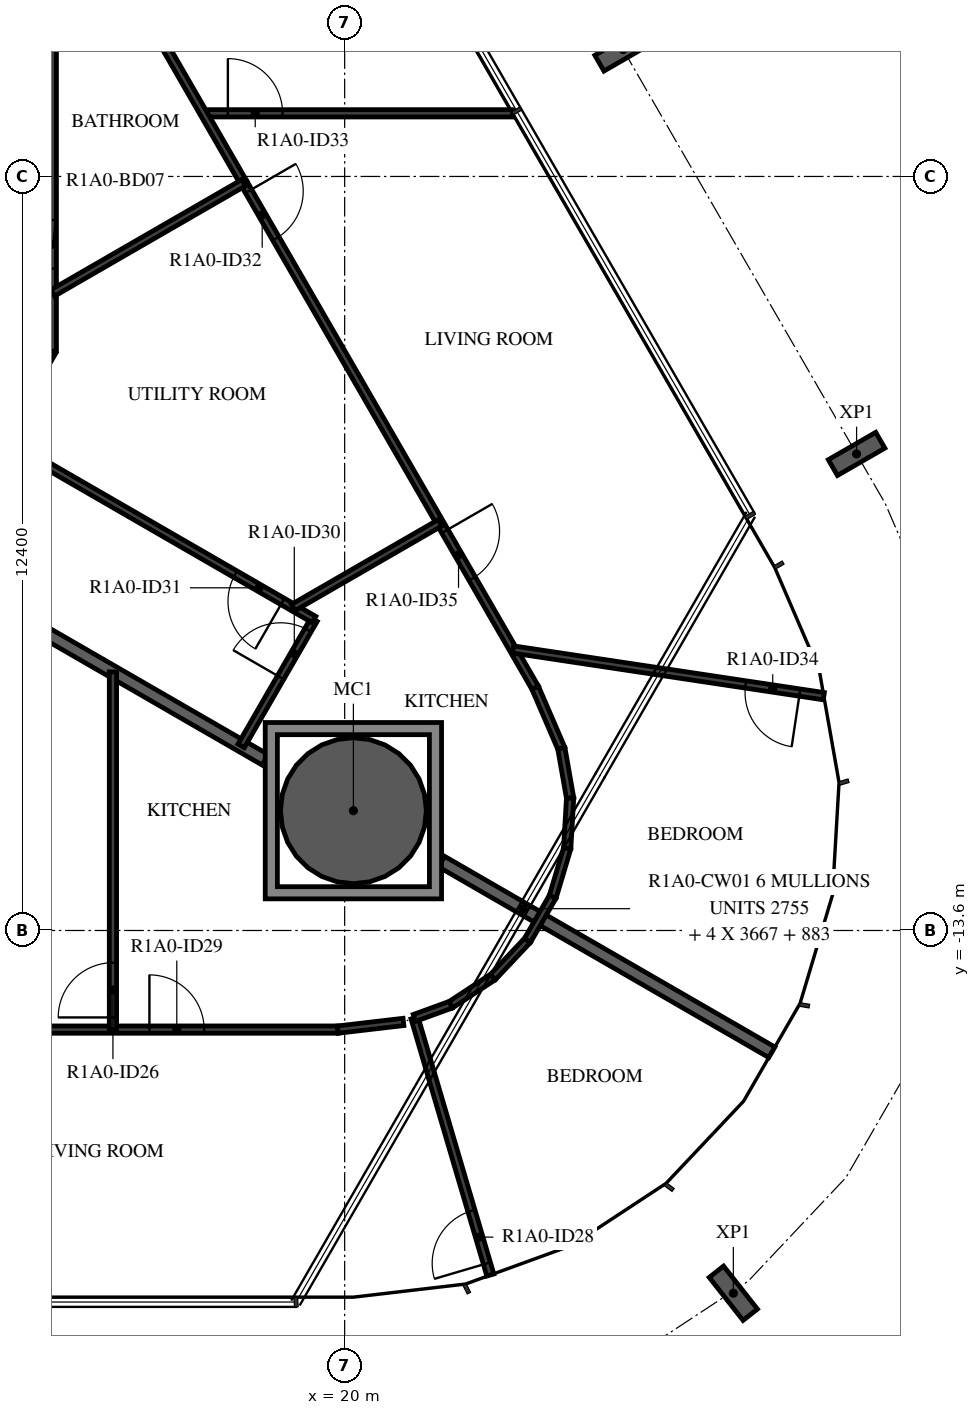
"""IFC4 building model, lengths in metres.
Left out: names, types, materials, properties, quantities, classifications, styles, units other than length and angle.
Written with IfcOpenShell. Run it as: python <this file> out.ifc"""

import sys

from ifc_helpers import new_model, si_unit, direction, frame, frame_2d, origin, origin_2d, place, context, subcontext, project, spatial, polyline, rectangle, hollow_circle, i_section, outline, extrude, element, fill, save


model = new_model("IFC4")
c1 = context("Model", 3, precision=1e-05, world=origin(), true_north=direction((0.0, 1.0)))
c2 = subcontext(c1, "Body", "Model", "MODEL_VIEW")
j1 = project(units=[si_unit("LENGTHUNIT", "METRE"), si_unit("PLANEANGLEUNIT", "RADIAN")], contexts=[c1])
p1 = place(None, origin())
s1 = spatial("IfcSite", under=j1, at=p1, CompositionType="ELEMENT")
p2 = place(p1, origin())
s2 = spatial("IfcBuilding", under=s1, at=p2, CompositionType="ELEMENT")
p3 = place(p2, frame((0.0, 0.0, 38.4)))
s3 = spatial("IfcBuildingStorey", under=s2, at=p3, CompositionType="ELEMENT", Elevation=38.4)
p4 = place(p3, frame((20.144, -11.63, -0.45), z_axis=(0.0, 0.0, 1.0), x_axis=(1.0, 0.0, 0.0)))
e1 = element("IfcColumn", 1, at=p4, inside=s3, PredefinedType="COLUMN", context=c2, shape_type="SweptSolid", body=[
    extrude(hollow_circle(Radius=1.2, WallThickness=0.06, at=origin_2d()), origin(), (0.0, 0.0, 1.0), 3.57),
])
for number, where, z_axis, x_axis in (
    (2, (26.392, -19.565, -0.45), (0.0, 0.0, 1.0), (-0.786, -0.619, 0.0)),
    (3, (28.419, -5.763, -0.45), (0.0, 0.0, 1.0), (0.5, -0.866, 0.0)),
    (4, (24.579, 0.888, -0.45), (0.0, 0.0, 1.0), (0.5, -0.866, 0.0)),
):
    element("IfcColumn", number, at=place(p3, frame(where, z_axis=z_axis, x_axis=x_axis)), inside=s3, PredefinedType="COLUMN", context=c2, shape_type="SweptSolid", body=[
        extrude(i_section(OverallWidth=0.3, OverallDepth=0.9, WebThickness=0.019, FlangeThickness=0.035, FilletRadius=0.03, at=origin_2d()), origin(), (0.0, 0.0, 1.0), 3.57),
    ])
p5 = place(p3, frame((18.694, -10.793, 0.0), z_axis=(0.0, 0.0, 1.0), x_axis=(-0.865964895271, 0.500104789178, 0.0)))
e5 = element("IfcWall", 5, at=p5, inside=s3, PredefinedType="STANDARD", context=c2, shape_type="SweptSolid", body=[
    extrude(rectangle(XDim=7.885, YDim=0.2, at=frame_2d((3.943, 0.0))), origin(), (0.0, 0.0, 1.0), 3.12),
])
p6 = place(p3, frame((27.025, -15.603, 0.0), z_axis=(0.0, 0.0, 1.0), x_axis=(-0.866030653443, 0.499990907215, 0.0)))
e6 = element("IfcWall", 6, at=p6, inside=s3, PredefinedType="STANDARD", context=c2, shape_type="SweptSolid", body=[
    extrude(rectangle(XDim=6.271, YDim=0.2, at=frame_2d((3.136, 0.0))), origin(), (0.0, 0.0, 1.0), 3.12),
])
p7 = place(p3, frame((9.124, -15.23, 0.0), z_axis=(0.0, 0.0, 1.0), x_axis=(1.0, 0.0, 0.0)))
e7 = element("IfcWall", 7, at=p7, inside=s3, PredefinedType="PARTITIONING", context=c2, shape_type="SweptSolid", body=[
    extrude(rectangle(XDim=10.764, YDim=0.12, at=frame_2d((5.382, 0.0))), origin(), (0.0, 0.0, 1.0), 3.12),
])
p8 = place(p7, frame((0.3, 0.0, 0.0)))
e8 = element("IfcOpeningElement", 8, at=p8, cuts=e7, PredefinedType="OPENING", context=c2, shape_type="SweptSolid", body=[
    extrude(rectangle(XDim=0.9, YDim=2.1, at=frame_2d((0.45, 1.05))), frame((0.0, 0.07, 0.0), z_axis=(0.0, -1.0, 0.0), x_axis=(1.0, 0.0, 0.0)), (0.0, 0.0, 1.0), 0.14),
])
p9 = place(p7, frame((7.665, 0.0, 0.0)))
e9 = element("IfcOpeningElement", 9, at=p9, cuts=e7, PredefinedType="OPENING", context=c2, shape_type="SweptSolid", body=[
    extrude(rectangle(XDim=0.9, YDim=2.1, at=frame_2d((0.45, 1.05))), frame((0.0, 0.07, 0.0), z_axis=(0.0, -1.0, 0.0), x_axis=(1.0, 0.0, 0.0)), (0.0, 0.0, 1.0), 0.14),
])
p10 = place(p3, frame((16.189, -15.23, 0.0), z_axis=(0.0, 0.0, 1.0), x_axis=(0.0, 1.0, 0.0)))
e10 = element("IfcWall", 10, at=p10, inside=s3, PredefinedType="PARTITIONING", context=c2, shape_type="SweptSolid", body=[
    extrude(rectangle(XDim=5.883, YDim=0.12, at=frame_2d((2.942, 0.0))), origin(), (0.0, 0.0, 1.0), 3.12),
])
p11 = place(p10, frame((0.2, 0.0, 0.0)))
e11 = element("IfcOpeningElement", 11, at=p11, cuts=e10, PredefinedType="OPENING", context=c2, shape_type="SweptSolid", body=[
    extrude(rectangle(XDim=0.9, YDim=2.1, at=frame_2d((0.45, 1.05))), frame((0.0, 0.07, 0.0), z_axis=(0.0, -1.0, 0.0), x_axis=(1.0, 0.0, 0.0)), (0.0, 0.0, 1.0), 0.14),
])
p12 = place(p3, frame((20.967, -15.104, 0.0), z_axis=(0.0, 0.0, 1.0), x_axis=(-0.993231641151, -0.116150363826, 0.0)))
e12 = element("IfcWall", 12, at=p12, inside=s3, PredefinedType="PARTITIONING", context=c2, shape_type="SweptSolid", body=[
    extrude(rectangle(XDim=1.087, YDim=0.12, at=frame_2d((0.543, 0.0))), origin(), (0.0, 0.0, 1.0), 3.12),
])
p13 = place(p3, frame((22.396, -19.266, 0.0), z_axis=(0.0, 0.0, 1.0), x_axis=(-0.282873823334, 0.959157130022, 0.0)))
e13 = element("IfcWall", 13, at=p13, inside=s3, PredefinedType="PARTITIONING", context=c2, shape_type="SweptSolid", body=[
    extrude(rectangle(XDim=4.409, YDim=0.12, at=frame_2d((2.204, 0.0))), origin(), (0.0, 0.0, 1.0), 3.12),
])
p14 = place(p13, frame((0.2, 0.0, 0.0)))
e14 = element("IfcOpeningElement", 14, at=p14, cuts=e13, PredefinedType="OPENING", context=c2, shape_type="SweptSolid", body=[
    extrude(rectangle(XDim=0.9, YDim=2.1, at=frame_2d((0.45, 1.05))), frame((0.0, 0.07, 0.0), z_axis=(0.0, -1.0, 0.0), x_axis=(1.0, 0.0, 0.0)), (0.0, 0.0, 1.0), 0.14),
])
p15 = place(p3, frame((21.149, -15.038, 0.0), z_axis=(0.0, 0.0, 1.0), x_axis=(0.939726102094, 0.341928140173, 0.0)))
e15 = element("IfcWall", 15, at=p15, inside=s3, PredefinedType="PARTITIONING", context=c2, shape_type="SweptSolid", body=[
    extrude(rectangle(XDim=0.635, YDim=0.12, at=frame_2d((0.318, 0.0))), origin(), (0.0, 0.0, 1.0), 3.12),
])
p16 = place(p3, frame((21.746, -14.82, 0.0), z_axis=(0.0, 0.0, 1.0), x_axis=(0.835477570013, 0.549524549046, 0.0)))
e16 = element("IfcWall", 16, at=p16, inside=s3, PredefinedType="PARTITIONING", context=c2, shape_type="SweptSolid", body=[
    extrude(rectangle(XDim=0.829, YDim=0.12, at=frame_2d((0.415, 0.0))), origin(), (0.0, 0.0, 1.0), 3.12),
])
p17 = place(p3, frame((22.438, -14.365, 0.0), z_axis=(0.0, 0.0, 1.0), x_axis=(0.686182189596, 0.727429723535, 0.0)))
e17 = element("IfcWall", 17, at=p17, inside=s3, PredefinedType="PARTITIONING", context=c2, shape_type="SweptSolid", body=[
    extrude(rectangle(XDim=0.829, YDim=0.12, at=frame_2d((0.414, 0.0))), origin(), (0.0, 0.0, 1.0), 3.12),
])
p18 = place(p3, frame((23.007, -13.762, 0.0), z_axis=(0.0, 0.0, 1.0), x_axis=(0.500002839747, 0.86602376425, 0.0)))
e18 = element("IfcWall", 18, at=p18, inside=s3, PredefinedType="PARTITIONING", context=c2, shape_type="SweptSolid", body=[
    extrude(rectangle(XDim=0.829, YDim=0.12, at=frame_2d((0.415, 0.0))), origin(), (0.0, 0.0, 1.0), 3.12),
])
p19 = place(p3, frame((18.298, -10.564, 0.0), z_axis=(0.0, 0.0, 1.0), x_axis=(0.499960392047, 0.866048270239, 0.0)))
e19 = element("IfcWall", 19, at=p19, inside=s3, PredefinedType="PARTITIONING", context=c2, shape_type="SweptSolid", body=[
    extrude(rectangle(XDim=2.398, YDim=0.12, at=frame_2d((1.199, 0.0))), origin(), (0.0, 0.0, 1.0), 3.12),
])
p20 = place(p19, frame((1.298, 0.0, 0.0)))
e20 = element("IfcOpeningElement", 20, at=p20, cuts=e19, PredefinedType="OPENING", context=c2, shape_type="SweptSolid", body=[
    extrude(rectangle(XDim=0.9, YDim=2.1, at=frame_2d((0.45, 1.05))), frame((0.0, 0.07, 0.0), z_axis=(0.0, -1.0, 0.0), x_axis=(1.0, 0.0, 0.0)), (0.0, 0.0, 1.0), 0.14),
])
p21 = place(p3, frame((19.497, -8.487, 0.0), z_axis=(0.0, 0.0, 1.0), x_axis=(-0.866027165828, 0.499996948039, 0.0)))
e21 = element("IfcWall", 21, at=p21, inside=s3, PredefinedType="PARTITIONING", context=c2, shape_type="SweptSolid", body=[
    extrude(rectangle(XDim=5.928, YDim=0.12, at=frame_2d((2.964, 0.0))), origin(), (0.0, 0.0, 1.0), 3.12),
])
p22 = place(p21, frame((0.595, 0.0, 0.0)))
e22 = element("IfcOpeningElement", 22, at=p22, cuts=e21, PredefinedType="OPENING", context=c2, shape_type="SweptSolid", body=[
    extrude(rectangle(XDim=0.9, YDim=2.1, at=frame_2d((0.45, 1.05))), frame((0.0, 0.07, 0.0), z_axis=(0.0, -1.0, 0.0), x_axis=(1.0, 0.0, 0.0)), (0.0, 0.0, 1.0), 0.14),
])
p23 = place(p3, frame((14.363, -5.523, 0.0), z_axis=(0.0, 0.0, 1.0), x_axis=(0.499995851058, 0.866027799164, 0.0)))
e23 = element("IfcWall", 23, at=p23, inside=s3, PredefinedType="PARTITIONING", context=c2, shape_type="SweptSolid", body=[
    extrude(rectangle(XDim=1.675, YDim=0.12, at=frame_2d((0.837, 0.0))), origin(), (0.0, 0.0, 1.0), 3.12),
])
p24 = place(p3, frame((15.2, -4.073, 0.0), z_axis=(0.0, 0.0, 1.0), x_axis=(0.0, 1.0, 0.0)))
e24 = element("IfcWall", 24, at=p24, inside=s3, PredefinedType="PARTITIONING", context=c2, shape_type="SweptSolid", body=[
    extrude(rectangle(XDim=8.146, YDim=0.12, at=frame_2d((4.073, 0.0))), origin(), (0.0, 0.0, 1.0), 3.12),
])
p25 = place(p24, frame((1.357, 0.0, 0.0)))
e25 = element("IfcOpeningElement", 25, at=p25, cuts=e24, PredefinedType="OPENING", context=c2, shape_type="SweptSolid", body=[
    extrude(rectangle(XDim=0.8, YDim=2.1, at=frame_2d((0.4, 1.05))), frame((0.0, 0.07, 0.0), z_axis=(0.0, -1.0, 0.0), x_axis=(1.0, 0.0, 0.0)), (0.0, 0.0, 1.0), 0.14),
])
p26 = place(p3, frame((17.679, -0.162, 0.0), z_axis=(0.0, 0.0, 1.0), x_axis=(1.0, 0.0, 0.0)))
e26 = element("IfcWall", 26, at=p26, inside=s3, PredefinedType="PARTITIONING", context=c2, shape_type="SweptSolid", body=[
    extrude(rectangle(XDim=5.081, YDim=0.12, at=frame_2d((2.54, 0.0))), origin(), (0.0, 0.0, 1.0), 3.12),
])
p27 = place(p26, frame((0.4, 0.0, 0.0)))
e27 = element("IfcOpeningElement", 27, at=p27, cuts=e26, PredefinedType="OPENING", context=c2, shape_type="SweptSolid", body=[
    extrude(rectangle(XDim=0.9, YDim=2.1, at=frame_2d((0.45, 1.05))), frame((0.0, 0.07, 0.0), z_axis=(0.0, -1.0, 0.0), x_axis=(1.0, 0.0, 0.0)), (0.0, 0.0, 1.0), 0.14),
])
p28 = place(p3, frame((15.11, 4.289, 0.0), z_axis=(0.0, 0.0, 1.0), x_axis=(0.500001702147, -0.866024421047, 0.0)))
e28 = element("IfcWall", 28, at=p28, inside=s3, PredefinedType="PARTITIONING", context=c2, shape_type="SweptSolid", body=[
    extrude(rectangle(XDim=6.458, YDim=0.12, at=frame_2d((3.229, 0.0))), origin(), (0.0, 0.0, 1.0), 3.12),
])
p29 = place(p3, frame((18.339, -1.303, 0.0), z_axis=(0.0, 0.0, 1.0), x_axis=(0.499989127021, -0.866031681211, 0.0)))
e29 = element("IfcWall", 29, at=p29, inside=s3, PredefinedType="PARTITIONING", context=c2, shape_type="SweptSolid", body=[
    extrude(rectangle(XDim=9.589, YDim=0.12, at=frame_2d((4.794, 0.0))), origin(), (0.0, 0.0, 1.0), 3.12),
])
p30 = place(p29, frame((0.16, 0.0, 0.0)))
e30 = element("IfcOpeningElement", 30, at=p30, cuts=e29, PredefinedType="OPENING", context=c2, shape_type="SweptSolid", body=[
    extrude(rectangle(XDim=0.9, YDim=2.1, at=frame_2d((0.45, 1.05))), frame((0.0, 0.07, 0.0), z_axis=(0.0, -1.0, 0.0), x_axis=(1.0, 0.0, 0.0)), (0.0, 0.0, 1.0), 0.14),
])
p31 = place(p29, frame((6.618, 0.0, 0.0)))
e31 = element("IfcOpeningElement", 31, at=p31, cuts=e29, PredefinedType="OPENING", context=c2, shape_type="SweptSolid", body=[
    extrude(rectangle(XDim=0.9, YDim=2.1, at=frame_2d((0.45, 1.05))), frame((0.0, 0.07, 0.0), z_axis=(0.0, -1.0, 0.0), x_axis=(1.0, 0.0, 0.0)), (0.0, 0.0, 1.0), 0.14),
])
p32 = place(p3, frame((23.133, -9.608, 0.0), z_axis=(0.0, 0.0, 1.0), x_axis=(0.396195073027, -0.918166359713, 0.0)))
e32 = element("IfcWall", 32, at=p32, inside=s3, PredefinedType="PARTITIONING", context=c2, shape_type="SweptSolid", body=[
    extrude(rectangle(XDim=1.087, YDim=0.12, at=frame_2d((0.543, 0.0))), origin(), (0.0, 0.0, 1.0), 3.12),
])
for number, where, z_axis, x_axis in (
    (33, (23.564, -10.606, 0.0), (0.0, 0.0, 1.0), (0.173, -0.985, 0.0)),
    (34, (23.708, -11.422, 0.0), (0.0, 0.0, 1.0), (-0.058, -0.998, 0.0)),
):
    element("IfcWall", number, at=place(p3, frame(where, z_axis=z_axis, x_axis=x_axis)), inside=s3, PredefinedType="PARTITIONING", context=c2, shape_type="SweptSolid", body=[
        extrude(rectangle(XDim=0.829, YDim=0.12, at=frame_2d((0.415, 0.0))), origin(), (0.0, 0.0, 1.0), 3.12),
    ])
p33 = place(p3, frame((23.659, -12.25, 0.0), z_axis=(0.0, 0.0, 1.0), x_axis=(-0.286834510868, -0.957980147694, 0.0)))
e35 = element("IfcWall", 35, at=p33, inside=s3, PredefinedType="PARTITIONING", context=c2, shape_type="SweptSolid", body=[
    extrude(rectangle(XDim=0.829, YDim=0.12, at=frame_2d((0.415, 0.0))), origin(), (0.0, 0.0, 1.0), 3.12),
])
p34 = place(p3, frame((27.88, -9.747, 0.0), z_axis=(0.0, 0.0, 1.0), x_axis=(-0.988899241625, 0.14858765061, 0.0)))
e36 = element("IfcWall", 36, at=p34, inside=s3, PredefinedType="PARTITIONING", context=c2, shape_type="SweptSolid", body=[
    extrude(rectangle(XDim=5.167, YDim=0.12, at=frame_2d((2.584, 0.0))), origin(), (0.0, 0.0, 1.0), 3.12),
])
p35 = place(p34, frame((0.4, 0.0, 0.0)))
e37 = element("IfcOpeningElement", 37, at=p35, cuts=e36, PredefinedType="OPENING", context=c2, shape_type="SweptSolid", body=[
    extrude(rectangle(XDim=0.9, YDim=2.1, at=frame_2d((0.45, 1.05))), frame((0.0, 0.07, 0.0), z_axis=(0.0, -1.0, 0.0), x_axis=(1.0, 0.0, 0.0)), (0.0, 0.0, 1.0), 0.14),
])
p36 = place(p3, frame((21.568, -6.896, 0.0), z_axis=(0.0, 0.0, 1.0), x_axis=(-0.866029478545, -0.499992942241, 0.0)))
e38 = element("IfcWall", 38, at=p36, inside=s3, PredefinedType="PARTITIONING", context=c2, shape_type="SweptSolid", body=[
    extrude(rectangle(XDim=2.787, YDim=0.12, at=frame_2d((1.393, 0.0))), origin(), (0.0, 0.0, 1.0), 3.12),
])
p37 = place(p3, frame((18.339, -1.303, 0.0), z_axis=(0.0, 0.0, 1.0), x_axis=(-0.866037510713, -0.499979029598, 0.0)))
e39 = element("IfcWall", 39, at=p37, inside=s3, PredefinedType="PARTITIONING", context=c2, shape_type="SweptSolid", body=[
    extrude(rectangle(XDim=3.624, YDim=0.12, at=frame_2d((1.812, 0.0))), origin(), (0.0, 0.0, 1.0), 3.12),
])
p38 = place(p3, origin())
e40 = element("IfcWall", 40, at=p38, inside=s3, PredefinedType="STANDARD", context=c2, shape_type="SweptSolid", body=[
    extrude(outline(polyline([(21.594, -10.18), (21.594, -13.08), (18.694, -13.08), (18.694, -10.18), (21.594, -10.18)]), holes=[polyline([(18.894, -12.88), (21.394, -12.88), (21.394, -10.38), (18.894, -10.38), (18.894, -12.88)])]), origin(), (0.0, 0.0, 1.0), 3.12),
])
p39 = place(p11, origin())
e41 = element("IfcDoor", 41, at=p39, inside=s3, OperationType="SINGLE_SWING_RIGHT", PredefinedType="DOOR", context=c2, shape_type="SweptSolid", body=[
    extrude(rectangle(XDim=0.9, YDim=2.1, at=frame_2d((0.45, 1.05))), frame((0.0, 0.025, 0.0), z_axis=(0.0, -1.0, 0.0), x_axis=(1.0, 0.0, 0.0)), (0.0, 0.0, 1.0), 0.05),
])
fill(e11, e41)
p40 = place(p14, origin())
e42 = element("IfcDoor", 42, at=p40, inside=s3, OperationType="SINGLE_SWING_RIGHT", PredefinedType="DOOR", context=c2, shape_type="SweptSolid", body=[
    extrude(rectangle(XDim=0.9, YDim=2.1, at=frame_2d((0.45, 1.05))), frame((0.0, 0.025, 0.0), z_axis=(0.0, -1.0, 0.0), x_axis=(1.0, 0.0, 0.0)), (0.0, 0.0, 1.0), 0.05),
])
fill(e14, e42)
p41 = place(p9, origin())
e43 = element("IfcDoor", 43, at=p41, inside=s3, OperationType="SINGLE_SWING_LEFT", PredefinedType="DOOR", context=c2, shape_type="SweptSolid", body=[
    extrude(rectangle(XDim=0.9, YDim=2.1, at=frame_2d((0.45, 1.05))), frame((0.0, 0.025, 0.0), z_axis=(0.0, -1.0, 0.0), x_axis=(1.0, 0.0, 0.0)), (0.0, 0.0, 1.0), 0.05),
])
fill(e9, e43)
p42 = place(p20, origin())
e44 = element("IfcDoor", 44, at=p42, inside=s3, OperationType="SINGLE_SWING_LEFT", PredefinedType="DOOR", context=c2, shape_type="SweptSolid", body=[
    extrude(rectangle(XDim=0.9, YDim=2.1, at=frame_2d((0.45, 1.05))), frame((0.0, 0.025, 0.0), z_axis=(0.0, -1.0, 0.0), x_axis=(1.0, 0.0, 0.0)), (0.0, 0.0, 1.0), 0.05),
])
fill(e20, e44)
p43 = place(p22, origin())
e45 = element("IfcDoor", 45, at=p43, inside=s3, OperationType="SINGLE_SWING_LEFT", PredefinedType="DOOR", context=c2, shape_type="SweptSolid", body=[
    extrude(rectangle(XDim=0.9, YDim=2.1, at=frame_2d((0.45, 1.05))), frame((0.0, 0.025, 0.0), z_axis=(0.0, -1.0, 0.0), x_axis=(1.0, 0.0, 0.0)), (0.0, 0.0, 1.0), 0.05),
])
fill(e22, e45)
p44 = place(p25, origin())
e46 = element("IfcDoor", 46, at=p44, inside=s3, OperationType="SINGLE_SWING_LEFT", PredefinedType="DOOR", context=c2, shape_type="SweptSolid", body=[
    extrude(rectangle(XDim=0.8, YDim=2.1, at=frame_2d((0.4, 1.05))), frame((0.0, 0.025, 0.0), z_axis=(0.0, -1.0, 0.0), x_axis=(1.0, 0.0, 0.0)), (0.0, 0.0, 1.0), 0.05),
])
fill(e25, e46)
p45 = place(p30, origin())
e47 = element("IfcDoor", 47, at=p45, inside=s3, OperationType="SINGLE_SWING_LEFT", PredefinedType="DOOR", context=c2, shape_type="SweptSolid", body=[
    extrude(rectangle(XDim=0.9, YDim=2.1, at=frame_2d((0.45, 1.05))), frame((0.0, 0.025, 0.0), z_axis=(0.0, -1.0, 0.0), x_axis=(1.0, 0.0, 0.0)), (0.0, 0.0, 1.0), 0.05),
])
fill(e30, e47)
p46 = place(p27, origin())
e48 = element("IfcDoor", 48, at=p46, inside=s3, OperationType="SINGLE_SWING_LEFT", PredefinedType="DOOR", context=c2, shape_type="SweptSolid", body=[
    extrude(rectangle(XDim=0.9, YDim=2.1, at=frame_2d((0.45, 1.05))), frame((0.0, 0.025, 0.0), z_axis=(0.0, -1.0, 0.0), x_axis=(1.0, 0.0, 0.0)), (0.0, 0.0, 1.0), 0.05),
])
fill(e27, e48)
p47 = place(p35, origin())
e49 = element("IfcDoor", 49, at=p47, inside=s3, OperationType="SINGLE_SWING_LEFT", PredefinedType="DOOR", context=c2, shape_type="SweptSolid", body=[
    extrude(rectangle(XDim=0.9, YDim=2.1, at=frame_2d((0.45, 1.05))), frame((0.0, 0.025, 0.0), z_axis=(0.0, -1.0, 0.0), x_axis=(1.0, 0.0, 0.0)), (0.0, 0.0, 1.0), 0.05),
])
fill(e37, e49)
p48 = place(p31, origin())
e50 = element("IfcDoor", 50, at=p48, inside=s3, OperationType="SINGLE_SWING_RIGHT", PredefinedType="DOOR", context=c2, shape_type="SweptSolid", body=[
    extrude(rectangle(XDim=0.9, YDim=2.1, at=frame_2d((0.45, 1.05))), frame((0.0, 0.025, 0.0), z_axis=(0.0, -1.0, 0.0), x_axis=(1.0, 0.0, 0.0)), (0.0, 0.0, 1.0), 0.05),
])
fill(e31, e50)
save(model, sys.argv[1])
